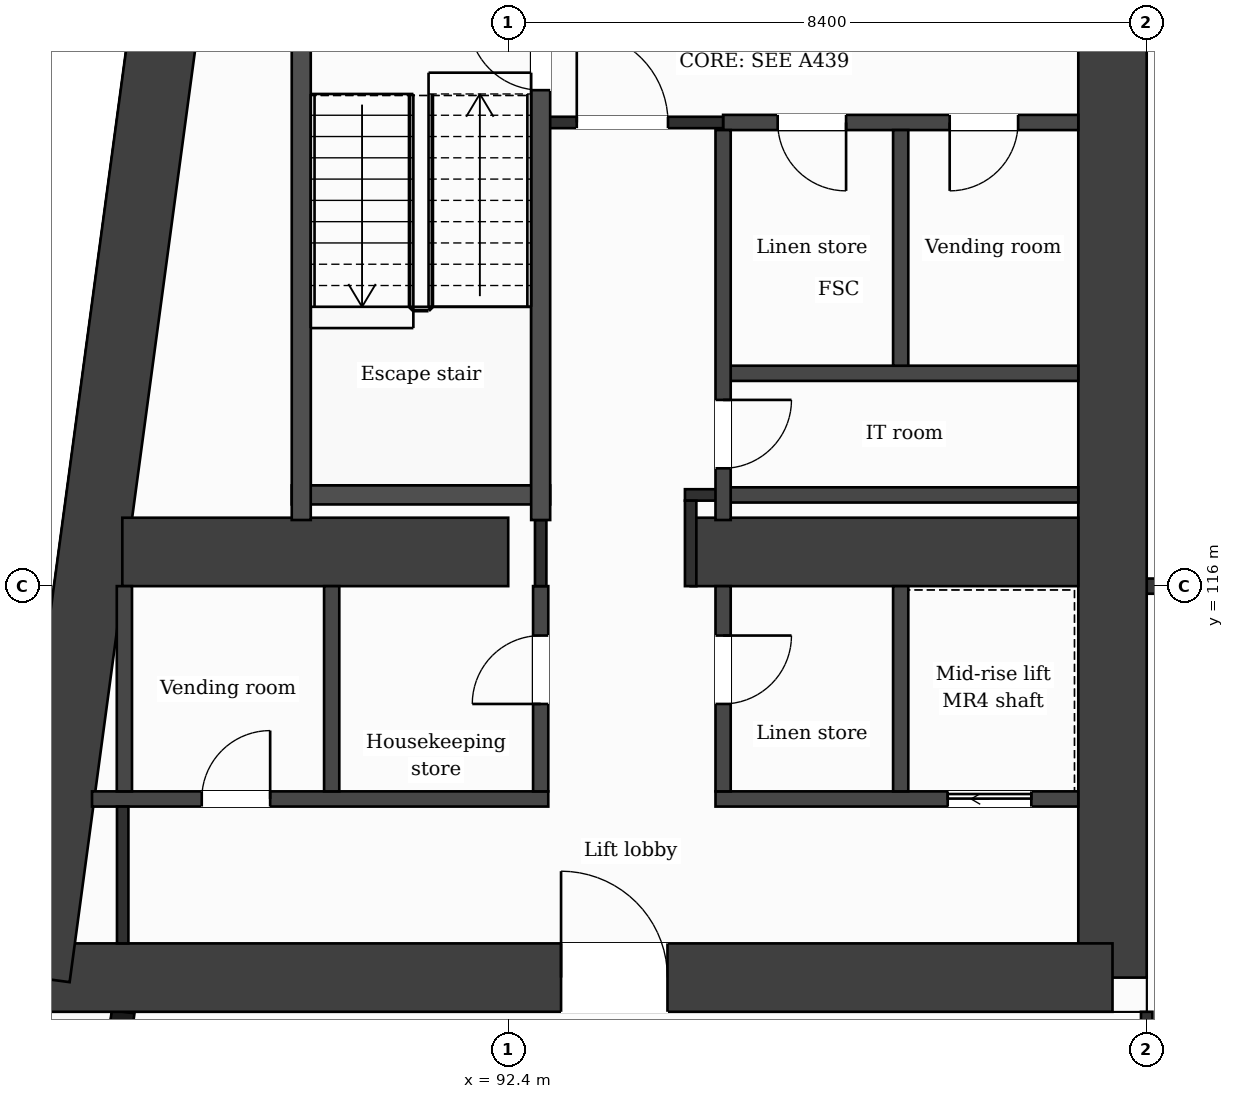
"""IFC4 building model, lengths in metres.
Left out: names, types, materials, properties, quantities, classifications, styles, units other than length and angle.
Written with IfcOpenShell. Run it as: python <this file> out.ifc"""

import sys

from ifc_helpers import new_model, si_unit, direction, frame, frame_2d, origin, place, context, subcontext, project, spatial, rectangle, extrude, element, fill, save


model = new_model("IFC4")
c1 = context("Model", 3, precision=1e-05, world=origin(), true_north=direction((0.0, 1.0)))
c2 = subcontext(c1, "Body", "Model", "MODEL_VIEW")
j1 = project(units=[si_unit("LENGTHUNIT", "METRE"), si_unit("PLANEANGLEUNIT", "RADIAN")], contexts=[c1])
p1 = place(None, origin())
s1 = spatial("IfcSite", under=j1, at=p1, CompositionType="ELEMENT")
p2 = place(p1, origin())
s2 = spatial("IfcBuilding", under=s1, at=p2, CompositionType="ELEMENT")
p3 = place(p2, frame((0.0, 0.0, 162.6)))
s3 = spatial("IfcBuildingStorey", under=s2, at=p3, CompositionType="ELEMENT", Elevation=162.6)
p4 = place(p3, frame((100.35, 131.95, 0.0), z_axis=(0.0, 0.0, 1.0), x_axis=(0.0, -1.0, 0.0)))
e1 = element("IfcWall", 1, at=p4, inside=s3, PredefinedType="SHEAR", context=c2, shape_type="SweptSolid", body=[
    extrude(rectangle(XDim=21.1, YDim=0.9, at=frame_2d((10.55, 0.0))), origin(), (0.0, 0.0, 1.0), 3.7),
])
p5 = place(p3, frame((100.35, 110.85, 0.0), z_axis=(0.0, 0.0, 1.0), x_axis=(-1.0, 0.0, 0.0)))
e2 = element("IfcWall", 2, at=p5, inside=s3, PredefinedType="SHEAR", context=c2, shape_type="SweptSolid", body=[
    extrude(rectangle(XDim=14.166, YDim=0.9, at=frame_2d((7.083, 0.0))), origin(), (0.0, 0.0, 1.0), 3.7),
])
p6 = place(p5, frame((5.855, 0.0, 0.0)))
e3 = element("IfcOpeningElement", 3, at=p6, cuts=e2, PredefinedType="OPENING", context=c2, shape_type="SweptSolid", body=[
    extrude(rectangle(XDim=1.4, YDim=2.1, at=frame_2d((0.7, 1.05))), frame((0.0, 0.46, 0.0), z_axis=(0.0, -1.0, 0.0), x_axis=(1.0, 0.0, 0.0)), (0.0, 0.0, 1.0), 0.92),
])
p7 = place(p3, frame((86.184, 110.85, 0.0), z_axis=(0.0, 0.0, 1.0), x_axis=(0.133410495943, 0.991060865725, 0.0)))
e4 = element("IfcWall", 4, at=p7, inside=s3, PredefinedType="SHEAR", context=c2, shape_type="SweptSolid", body=[
    extrude(rectangle(XDim=21.29, YDim=0.9, at=frame_2d((10.645, 0.0))), origin(), (0.0, 0.0, 1.0), 3.7),
])
p8 = place(p3, frame((87.323, 116.45, 0.0), z_axis=(0.0, 0.0, 1.0), x_axis=(1.0, 0.0, 0.0)))
e5 = element("IfcWall", 5, at=p8, inside=s3, PredefinedType="SHEAR", context=c2, shape_type="SweptSolid", body=[
    extrude(rectangle(XDim=5.077, YDim=0.9, at=frame_2d((2.539, 0.0))), origin(), (0.0, 0.0, 1.0), 3.7),
])
p9 = place(p3, frame((94.8, 116.45, 0.0), z_axis=(0.0, 0.0, 1.0), x_axis=(1.0, 0.0, 0.0)))
e6 = element("IfcWall", 6, at=p9, inside=s3, PredefinedType="SHEAR", context=c2, shape_type="SweptSolid", body=[
    extrude(rectangle(XDim=5.1, YDim=0.9, at=frame_2d((2.55, 0.0))), origin(), (0.0, 0.0, 1.0), 3.7),
])
p10 = place(p3, frame((87.334, 110.4, 0.0), z_axis=(0.0, 0.0, 1.0), x_axis=(-0.133437175554, -0.991057273915, 0.0)))
e7 = element("IfcWall", 7, at=p10, inside=s3, PredefinedType="SOLIDWALL", context=c2, shape_type="SweptSolid", body=[
    extrude(rectangle(XDim=6.781, YDim=0.3, at=frame_2d((3.39, 0.0))), origin(), (0.0, 0.0, 1.0), 3.38),
])
p11 = place(p10, frame((1.418, 0.0, 0.0)))
e8 = element("IfcOpeningElement", 8, at=p11, cuts=e7, PredefinedType="OPENING", context=c2, shape_type="SweptSolid", body=[
    extrude(rectangle(XDim=1.2, YDim=2.4, at=frame_2d((0.6, 1.2))), frame((0.0, 0.16, 0.0), z_axis=(0.0, -1.0, 0.0), x_axis=(1.0, 0.0, 0.0)), (0.0, 0.0, 1.0), 0.32),
])
p12 = place(p10, frame((4.758, 0.0, 0.9)))
e9 = element("IfcOpeningElement", 9, at=p12, cuts=e7, PredefinedType="OPENING", context=c2, shape_type="SweptSolid", body=[
    extrude(rectangle(XDim=1.2, YDim=2.1, at=frame_2d((0.6, 1.05))), frame((0.0, 0.16, 0.0), z_axis=(0.0, -1.0, 0.0), x_axis=(1.0, 0.0, 0.0)), (0.0, 0.0, 1.0), 0.32),
])
p13 = place(p3, frame((86.924, 113.2, 0.0), z_axis=(0.0, 0.0, 1.0), x_axis=(1.0, 0.0, 0.0)))
e10 = element("IfcWall", 10, at=p13, inside=s3, PredefinedType="PARTITIONING", context=c2, shape_type="SweptSolid", body=[
    extrude(rectangle(XDim=6.003, YDim=0.2, at=frame_2d((3.001, 0.0))), origin(), (0.0, 0.0, 1.0), 3.38),
])
p14 = place(p13, frame((1.444, 0.0, 0.0)))
e11 = element("IfcOpeningElement", 11, at=p14, cuts=e10, PredefinedType="OPENING", context=c2, shape_type="SweptSolid", body=[
    extrude(rectangle(XDim=0.9, YDim=2.1, at=frame_2d((0.45, 1.05))), frame((0.0, 0.11, 0.0), z_axis=(0.0, -1.0, 0.0), x_axis=(1.0, 0.0, 0.0)), (0.0, 0.0, 1.0), 0.22),
])
p15 = place(p3, frame((95.127, 113.2, 0.0), z_axis=(0.0, 0.0, 1.0), x_axis=(1.0, 0.0, 0.0)))
e12 = element("IfcWall", 12, at=p15, inside=s3, PredefinedType="PARTITIONING", context=c2, shape_type="SweptSolid", body=[
    extrude(rectangle(XDim=4.773, YDim=0.2, at=frame_2d((2.386, 0.0))), origin(), (0.0, 0.0, 1.0), 3.38),
])
p16 = place(p15, frame((3.055, 0.0, 0.0)))
e13 = element("IfcOpeningElement", 13, at=p16, cuts=e12, PredefinedType="OPENING", context=c2, shape_type="SweptSolid", body=[
    extrude(rectangle(XDim=1.1, YDim=2.1, at=frame_2d((0.55, 1.05))), frame((0.0, 0.11, 0.0), z_axis=(0.0, -1.0, 0.0), x_axis=(1.0, 0.0, 0.0)), (0.0, 0.0, 1.0), 0.22),
])
p17 = place(p3, frame((100.8, 116.0, 0.0), z_axis=(0.0, 0.0, 1.0), x_axis=(1.0, 0.0, 0.0)))
e14 = element("IfcWall", 14, at=p17, inside=s3, PredefinedType="PARTITIONING", context=c2, shape_type="SweptSolid", body=[
    extrude(rectangle(XDim=8.4, YDim=0.2, at=frame_2d((4.2, 0.0))), origin(), (0.0, 0.0, 1.0), 3.38),
])
p18 = place(p3, frame((95.227, 117.2, 0.0), z_axis=(0.0, 0.0, 1.0), x_axis=(1.0, 0.0, 0.0)))
e15 = element("IfcWall", 15, at=p18, inside=s3, PredefinedType="PARTITIONING", context=c2, shape_type="SweptSolid", body=[
    extrude(rectangle(XDim=4.673, YDim=0.2, at=frame_2d((2.336, 0.0))), origin(), (0.0, 0.0, 1.0), 3.38),
])
p19 = place(p3, frame((94.725, 117.2, 0.0), z_axis=(0.0, 0.0, 1.0), x_axis=(1.0, 0.0, 0.0)))
e16 = element("IfcWall", 16, at=p19, inside=s3, PredefinedType="PARTITIONING", context=c2, shape_type="SweptSolid", body=[
    extrude(rectangle(XDim=0.502, YDim=0.15, at=frame_2d((0.251, 0.0))), origin(), (0.0, 0.0, 1.0), 3.38),
])
p20 = place(p3, frame((89.552, 117.2, 0.0), z_axis=(0.0, 0.0, 1.0), x_axis=(1.0, 0.0, 0.0)))
e17 = element("IfcWall", 17, at=p20, inside=s3, PredefinedType="PARTITIONING", context=c2, shape_type="SweptSolid", body=[
    extrude(rectangle(XDim=3.4, YDim=0.25, at=frame_2d((1.7, 0.0))), origin(), (0.0, 0.0, 1.0), 3.38),
])
p21 = place(p3, frame((95.227, 118.8, 0.0), z_axis=(0.0, 0.0, 1.0), x_axis=(1.0, 0.0, 0.0)))
e18 = element("IfcWall", 18, at=p21, inside=s3, PredefinedType="PARTITIONING", context=c2, shape_type="SweptSolid", body=[
    extrude(rectangle(XDim=4.673, YDim=0.2, at=frame_2d((2.336, 0.0))), origin(), (0.0, 0.0, 1.0), 3.38),
])
p22 = place(p3, frame((95.227, 122.1, 0.0), z_axis=(0.0, 0.0, 1.0), x_axis=(1.0, 0.0, 0.0)))
e19 = element("IfcWall", 19, at=p22, inside=s3, PredefinedType="PARTITIONING", context=c2, shape_type="SweptSolid", body=[
    extrude(rectangle(XDim=4.673, YDim=0.2, at=frame_2d((2.336, 0.0))), origin(), (0.0, 0.0, 1.0), 3.38),
])
p23 = place(p22, frame((0.718, 0.0, 0.0)))
e20 = element("IfcOpeningElement", 20, at=p23, cuts=e19, PredefinedType="OPENING", context=c2, shape_type="SweptSolid", body=[
    extrude(rectangle(XDim=0.9, YDim=2.1, at=frame_2d((0.45, 1.05))), frame((0.0, 0.11, 0.0), z_axis=(0.0, -1.0, 0.0), x_axis=(1.0, 0.0, 0.0)), (0.0, 0.0, 1.0), 0.22),
])
p24 = place(p22, frame((2.981, 0.0, 0.0)))
e21 = element("IfcOpeningElement", 21, at=p24, cuts=e19, PredefinedType="OPENING", context=c2, shape_type="SweptSolid", body=[
    extrude(rectangle(XDim=0.9, YDim=2.1, at=frame_2d((0.45, 1.05))), frame((0.0, 0.11, 0.0), z_axis=(0.0, -1.0, 0.0), x_axis=(1.0, 0.0, 0.0)), (0.0, 0.0, 1.0), 0.22),
])
p25 = place(p3, frame((92.827, 122.1, 0.0), z_axis=(0.0, 0.0, 1.0), x_axis=(1.0, 0.0, 0.0)))
e22 = element("IfcWall", 22, at=p25, inside=s3, PredefinedType="PARTITIONING", context=c2, shape_type="SweptSolid", body=[
    extrude(rectangle(XDim=2.4, YDim=0.15, at=frame_2d((1.2, 0.0))), origin(), (0.0, 0.0, 1.0), 3.38),
])
p26 = place(p25, frame((0.475, 0.0, 0.0)))
e23 = element("IfcOpeningElement", 23, at=p26, cuts=e22, PredefinedType="OPENING", context=c2, shape_type="SweptSolid", body=[
    extrude(rectangle(XDim=1.2, YDim=2.1, at=frame_2d((0.6, 1.05))), frame((0.0, 0.085, 0.0), z_axis=(0.0, -1.0, 0.0), x_axis=(1.0, 0.0, 0.0)), (0.0, 0.0, 1.0), 0.17),
])
p27 = place(p3, frame((87.35, 113.3, 0.0), z_axis=(0.0, 0.0, 1.0), x_axis=(0.0, 1.0, 0.0)))
e24 = element("IfcWall", 24, at=p27, inside=s3, PredefinedType="PARTITIONING", context=c2, shape_type="SweptSolid", body=[
    extrude(rectangle(XDim=2.7, YDim=0.2, at=frame_2d((1.35, 0.0))), origin(), (0.0, 0.0, 1.0), 3.38),
])
p28 = place(p3, frame((87.328, 111.3, 0.0), z_axis=(0.0, 0.0, 1.0), x_axis=(0.0, 1.0, 0.0)))
e25 = element("IfcWall", 25, at=p28, inside=s3, PredefinedType="PARTITIONING", context=c2, shape_type="SweptSolid", body=[
    extrude(rectangle(XDim=1.8, YDim=0.15, at=frame_2d((0.9, 0.0))), origin(), (0.0, 0.0, 1.0), 3.38),
])
p29 = place(p3, frame((89.677, 116.87, 0.0), z_axis=(0.0, 0.0, 1.0), x_axis=(0.0, 1.0, 0.0)))
e26 = element("IfcWall", 26, at=p29, inside=s3, PredefinedType="PARTITIONING", context=c2, shape_type="SweptSolid", body=[
    extrude(rectangle(XDim=6.955, YDim=0.25, at=frame_2d((3.478, 0.0))), origin(), (0.0, 0.0, 1.0), 3.38),
])
p30 = place(p3, frame((90.077, 113.3, 0.0), z_axis=(0.0, 0.0, 1.0), x_axis=(0.0, 1.0, 0.0)))
e27 = element("IfcWall", 27, at=p30, inside=s3, PredefinedType="PARTITIONING", context=c2, shape_type="SweptSolid", body=[
    extrude(rectangle(XDim=2.7, YDim=0.2, at=frame_2d((1.35, 0.0))), origin(), (0.0, 0.0, 1.0), 3.38),
])
p31 = place(p3, frame((92.827, 113.3, 0.0), z_axis=(0.0, 0.0, 1.0), x_axis=(0.0, 1.0, 0.0)))
e28 = element("IfcWall", 28, at=p31, inside=s3, PredefinedType="PARTITIONING", context=c2, shape_type="SweptSolid", body=[
    extrude(rectangle(XDim=2.7, YDim=0.2, at=frame_2d((1.35, 0.0))), origin(), (0.0, 0.0, 1.0), 3.38),
])
p32 = place(p31, frame((1.15, 0.0, 0.0)))
e29 = element("IfcOpeningElement", 29, at=p32, cuts=e28, PredefinedType="OPENING", context=c2, shape_type="SweptSolid", body=[
    extrude(rectangle(XDim=0.9, YDim=2.1, at=frame_2d((0.45, 1.05))), frame((0.0, 0.11, 0.0), z_axis=(0.0, -1.0, 0.0), x_axis=(1.0, 0.0, 0.0)), (0.0, 0.0, 1.0), 0.22),
])
p33 = place(p3, frame((92.827, 116.0, 0.0), z_axis=(0.0, 0.0, 1.0), x_axis=(0.0, 1.0, 0.0)))
e30 = element("IfcWall", 30, at=p33, inside=s3, PredefinedType="PARTITIONING", context=c2, shape_type="SweptSolid", body=[
    extrude(rectangle(XDim=0.87, YDim=0.15, at=frame_2d((0.435, 0.0))), origin(), (0.0, 0.0, 1.0), 3.38),
])
p34 = place(p3, frame((92.827, 116.87, 0.0), z_axis=(0.0, 0.0, 1.0), x_axis=(0.0, 1.0, 0.0)))
e31 = element("IfcWall", 31, at=p34, inside=s3, PredefinedType="PARTITIONING", context=c2, shape_type="SweptSolid", body=[
    extrude(rectangle(XDim=6.955, YDim=0.25, at=frame_2d((3.478, 0.0))), origin(), (0.0, 0.0, 1.0), 3.38),
])
p35 = place(p34, frame((5.655, 0.0, 0.0)))
e32 = element("IfcOpeningElement", 32, at=p35, cuts=e31, PredefinedType="OPENING", context=c2, shape_type="SweptSolid", body=[
    extrude(rectangle(XDim=0.95, YDim=2.1, at=frame_2d((0.475, 1.05))), frame((0.0, 0.135, 0.0), z_axis=(0.0, -1.0, 0.0), x_axis=(1.0, 0.0, 0.0)), (0.0, 0.0, 1.0), 0.27),
])
p36 = place(p3, frame((94.8, 116.0, 0.0), z_axis=(0.0, 0.0, 1.0), x_axis=(0.0, 1.0, 0.0)))
e33 = element("IfcWall", 33, at=p36, inside=s3, PredefinedType="PARTITIONING", context=c2, shape_type="SweptSolid", body=[
    extrude(rectangle(XDim=1.125, YDim=0.15, at=frame_2d((0.562, 0.0))), origin(), (0.0, 0.0, 1.0), 3.38),
])
p37 = place(p3, frame((95.227, 113.3, 0.0), z_axis=(0.0, 0.0, 1.0), x_axis=(0.0, 1.0, 0.0)))
e34 = element("IfcWall", 34, at=p37, inside=s3, PredefinedType="PARTITIONING", context=c2, shape_type="SweptSolid", body=[
    extrude(rectangle(XDim=2.7, YDim=0.2, at=frame_2d((1.35, 0.0))), origin(), (0.0, 0.0, 1.0), 3.38),
])
p38 = place(p37, frame((1.15, 0.0, 0.0)))
e35 = element("IfcOpeningElement", 35, at=p38, cuts=e34, PredefinedType="OPENING", context=c2, shape_type="SweptSolid", body=[
    extrude(rectangle(XDim=0.9, YDim=2.1, at=frame_2d((0.45, 1.05))), frame((0.0, 0.11, 0.0), z_axis=(0.0, -1.0, 0.0), x_axis=(1.0, 0.0, 0.0)), (0.0, 0.0, 1.0), 0.22),
])
p39 = place(p3, frame((95.227, 116.87, 0.0), z_axis=(0.0, 0.0, 1.0), x_axis=(0.0, 1.0, 0.0)))
e36 = element("IfcWall", 36, at=p39, inside=s3, PredefinedType="PARTITIONING", context=c2, shape_type="SweptSolid", body=[
    extrude(rectangle(XDim=5.13, YDim=0.2, at=frame_2d((2.565, 0.0))), origin(), (0.0, 0.0, 1.0), 3.38),
])
p40 = place(p39, frame((0.68, 0.0, 0.0)))
e37 = element("IfcOpeningElement", 37, at=p40, cuts=e36, PredefinedType="OPENING", context=c2, shape_type="SweptSolid", body=[
    extrude(rectangle(XDim=0.9, YDim=2.1, at=frame_2d((0.45, 1.05))), frame((0.0, 0.11, 0.0), z_axis=(0.0, -1.0, 0.0), x_axis=(1.0, 0.0, 0.0)), (0.0, 0.0, 1.0), 0.22),
])
p41 = place(p3, frame((97.563, 113.3, 0.0), z_axis=(0.0, 0.0, 1.0), x_axis=(0.0, 1.0, 0.0)))
e38 = element("IfcWall", 38, at=p41, inside=s3, PredefinedType="PARTITIONING", context=c2, shape_type="SweptSolid", body=[
    extrude(rectangle(XDim=2.7, YDim=0.2, at=frame_2d((1.35, 0.0))), origin(), (0.0, 0.0, 1.0), 3.38),
])
p42 = place(p3, frame((97.563, 118.9, 0.0), z_axis=(0.0, 0.0, 1.0), x_axis=(0.0, 1.0, 0.0)))
e39 = element("IfcWall", 39, at=p42, inside=s3, PredefinedType="PARTITIONING", context=c2, shape_type="SweptSolid", body=[
    extrude(rectangle(XDim=3.1, YDim=0.2, at=frame_2d((1.55, 0.0))), origin(), (0.0, 0.0, 1.0), 3.38),
])
p43 = place(p3, frame((100.8, 109.075, 0.0), z_axis=(0.0, 0.0, 1.0), x_axis=(0.0, 1.0, 0.0)))
e40 = element("IfcWall", 40, at=p43, inside=s3, PredefinedType="PARTITIONING", context=c2, shape_type="SweptSolid", body=[
    extrude(rectangle(XDim=1.325, YDim=0.15, at=frame_2d((0.663, 0.0))), origin(), (0.0, 0.0, 1.0), 3.38),
])
p44 = place(p26, origin())
e41 = element("IfcDoor", 41, at=p44, inside=s3, OperationType="SINGLE_SWING_LEFT", PredefinedType="DOOR", context=c2, shape_type="SweptSolid", body=[
    extrude(rectangle(XDim=1.2, YDim=2.1, at=frame_2d((0.6, 1.05))), frame((0.0, 0.025, 0.0), z_axis=(0.0, -1.0, 0.0), x_axis=(1.0, 0.0, 0.0)), (0.0, 0.0, 1.0), 0.05),
])
fill(e23, e41)
p45 = place(p23, origin())
e42 = element("IfcDoor", 42, at=p45, inside=s3, OperationType="SINGLE_SWING_RIGHT", PredefinedType="DOOR", context=c2, shape_type="SweptSolid", body=[
    extrude(rectangle(XDim=0.9, YDim=2.1, at=frame_2d((0.45, 1.05))), frame((0.0, 0.025, 0.0), z_axis=(0.0, -1.0, 0.0), x_axis=(1.0, 0.0, 0.0)), (0.0, 0.0, 1.0), 0.05),
])
fill(e20, e42)
p46 = place(p24, origin())
e43 = element("IfcDoor", 43, at=p46, inside=s3, OperationType="SINGLE_SWING_LEFT", PredefinedType="DOOR", context=c2, shape_type="SweptSolid", body=[
    extrude(rectangle(XDim=0.9, YDim=2.1, at=frame_2d((0.45, 1.05))), frame((0.0, 0.025, 0.0), z_axis=(0.0, -1.0, 0.0), x_axis=(1.0, 0.0, 0.0)), (0.0, 0.0, 1.0), 0.05),
])
fill(e21, e43)
p47 = place(p35, origin())
e44 = element("IfcDoor", 44, at=p47, inside=s3, OperationType="SINGLE_SWING_RIGHT", PredefinedType="DOOR", context=c2, shape_type="SweptSolid", body=[
    extrude(rectangle(XDim=0.95, YDim=2.1, at=frame_2d((0.475, 1.05))), frame((0.0, 0.025, 0.0), z_axis=(0.0, -1.0, 0.0), x_axis=(1.0, 0.0, 0.0)), (0.0, 0.0, 1.0), 0.05),
])
fill(e32, e44)
p48 = place(p40, origin())
e45 = element("IfcDoor", 45, at=p48, inside=s3, OperationType="SINGLE_SWING_RIGHT", PredefinedType="DOOR", context=c2, shape_type="SweptSolid", body=[
    extrude(rectangle(XDim=0.9, YDim=2.1, at=frame_2d((0.45, 1.05))), frame((0.0, 0.025, 0.0), z_axis=(0.0, -1.0, 0.0), x_axis=(1.0, 0.0, 0.0)), (0.0, 0.0, 1.0), 0.05),
])
fill(e37, e45)
p49 = place(p16, origin())
e46 = element("IfcDoor", 46, at=p49, inside=s3, OperationType="SLIDING_TO_LEFT", PredefinedType="DOOR", context=c2, shape_type="SweptSolid", body=[
    extrude(rectangle(XDim=1.1, YDim=2.1, at=frame_2d((0.55, 1.05))), frame((0.0, 0.025, 0.0), z_axis=(0.0, -1.0, 0.0), x_axis=(1.0, 0.0, 0.0)), (0.0, 0.0, 1.0), 0.05),
])
fill(e13, e46)
p50 = place(p14, origin())
e47 = element("IfcDoor", 47, at=p50, inside=s3, OperationType="SINGLE_SWING_RIGHT", PredefinedType="DOOR", context=c2, shape_type="SweptSolid", body=[
    extrude(rectangle(XDim=0.9, YDim=2.1, at=frame_2d((0.45, 1.05))), frame((0.0, 0.025, 0.0), z_axis=(0.0, -1.0, 0.0), x_axis=(1.0, 0.0, 0.0)), (0.0, 0.0, 1.0), 0.05),
])
fill(e11, e47)
p51 = place(p32, origin())
e48 = element("IfcDoor", 48, at=p51, inside=s3, OperationType="SINGLE_SWING_LEFT", PredefinedType="DOOR", context=c2, shape_type="SweptSolid", body=[
    extrude(rectangle(XDim=0.9, YDim=2.1, at=frame_2d((0.45, 1.05))), frame((0.0, 0.025, 0.0), z_axis=(0.0, -1.0, 0.0), x_axis=(1.0, 0.0, 0.0)), (0.0, 0.0, 1.0), 0.05),
])
fill(e29, e48)
p52 = place(p38, origin())
e49 = element("IfcDoor", 49, at=p52, inside=s3, OperationType="SINGLE_SWING_RIGHT", PredefinedType="DOOR", context=c2, shape_type="SweptSolid", body=[
    extrude(rectangle(XDim=0.9, YDim=2.1, at=frame_2d((0.45, 1.05))), frame((0.0, 0.025, 0.0), z_axis=(0.0, -1.0, 0.0), x_axis=(1.0, 0.0, 0.0)), (0.0, 0.0, 1.0), 0.05),
])
fill(e35, e49)
p53 = place(p6, origin())
e50 = element("IfcDoor", 50, at=p53, inside=s3, OperationType="SINGLE_SWING_RIGHT", PredefinedType="DOOR", context=c2, shape_type="SweptSolid", body=[
    extrude(rectangle(XDim=1.4, YDim=2.1, at=frame_2d((0.7, 1.05))), frame((0.0, 0.025, 0.0), z_axis=(0.0, -1.0, 0.0), x_axis=(1.0, 0.0, 0.0)), (0.0, 0.0, 1.0), 0.05),
])
fill(e3, e50)
save(model, sys.argv[1])
